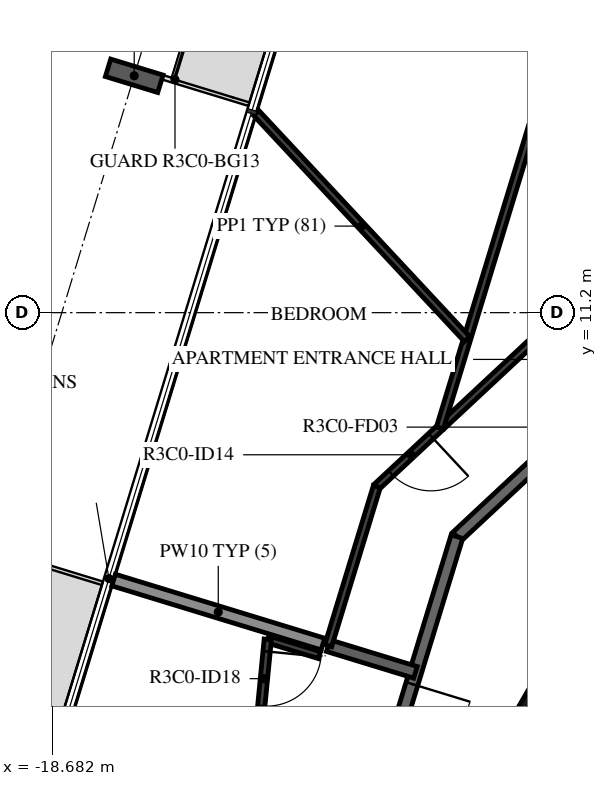
"""IFC4 building model, lengths in metres.
Left out: names, types, materials, properties, quantities, classifications, styles, units other than length and angle.
Written with IfcOpenShell. Run it as: python <this file> out.ifc"""

import sys

from ifc_helpers import new_model, si_unit, direction, frame, frame_2d, origin, origin_2d, place, context, subcontext, project, spatial, rectangle, i_section, extrude, element, fill, save


model = new_model("IFC4")
c1 = context("Model", 3, precision=1e-05, world=origin(), true_north=direction((0.0, 1.0)))
c2 = subcontext(c1, "Body", "Model", "MODEL_VIEW")
j1 = project(units=[si_unit("LENGTHUNIT", "METRE"), si_unit("PLANEANGLEUNIT", "RADIAN")], contexts=[c1])
p1 = place(None, origin())
s1 = spatial("IfcSite", under=j1, at=p1, CompositionType="ELEMENT")
p2 = place(p1, origin())
s2 = spatial("IfcBuilding", under=s1, at=p2, CompositionType="ELEMENT")
p3 = place(p2, frame((0.0, 0.0, 134.4)))
s3 = spatial("IfcBuildingStorey", under=s2, at=p3, CompositionType="ELEMENT", Elevation=134.4)
p4 = place(p3, frame((-17.335, 15.095, -0.38), z_axis=(0.0, 0.0, 1.0), x_axis=(0.29237190653, 0.956304694264, 0.0)))
e1 = element("IfcColumn", 1, at=p4, inside=s3, PredefinedType="COLUMN", context=c2, shape_type="SweptSolid", body=[
    extrude(i_section(OverallWidth=0.3, OverallDepth=0.9, WebThickness=0.019, FlangeThickness=0.035, FilletRadius=0.03, at=origin_2d()), origin(), (0.0, 0.0, 1.0), 3.5),
])
p5 = place(p3, frame((-9.329, 7.137, 0.0), z_axis=(0.0, 0.0, 1.0), x_axis=(-0.500087131594, -0.865975092491, 0.0)))
e2 = element("IfcWall", 2, at=p5, inside=s3, PredefinedType="SHEAR", context=c2, shape_type="SweptSolid", body=[
    extrude(rectangle(XDim=3.033, YDim=0.5, at=frame_2d((1.516, 0.0))), origin(), (0.0, 0.0, 1.0), 3.12),
])
p6 = place(p3, frame((-6.659, 12.523, 0.0), z_axis=(0.0, 0.0, 1.0), x_axis=(-0.731350455479, -0.682001841105, 0.0)))
e3 = element("IfcWall", 3, at=p6, inside=s3, PredefinedType="STANDARD", context=c2, shape_type="SweptSolid", body=[
    extrude(rectangle(XDim=7.342, YDim=0.2, at=frame_2d((3.671, 0.0))), origin(), (0.0, 0.0, 1.0), 3.12),
])
p7 = place(p6, frame((4.2, 0.0, 0.0)))
e4 = element("IfcOpeningElement", 4, at=p7, cuts=e3, PredefinedType="OPENING", context=c2, shape_type="SweptSolid", body=[
    extrude(rectangle(XDim=1.0, YDim=2.1, at=frame_2d((0.5, 1.05))), frame((0.0, 0.11, 0.0), z_axis=(0.0, -1.0, 0.0), x_axis=(1.0, 0.0, 0.0)), (0.0, 0.0, 1.0), 0.22),
])
p8 = place(p3, frame((-12.028, 7.516, 0.0), z_axis=(0.0, 0.0, 1.0), x_axis=(-0.292365533182, -0.956306642771, 0.0)))
e5 = element("IfcWall", 5, at=p8, inside=s3, PredefinedType="STANDARD", context=c2, shape_type="SweptSolid", body=[
    extrude(rectangle(XDim=7.342, YDim=0.2, at=frame_2d((3.671, 0.0))), origin(), (0.0, 0.0, 1.0), 3.12),
])
p9 = place(p8, frame((2.533, 0.0, 0.0)))
e6 = element("IfcOpeningElement", 6, at=p9, cuts=e5, PredefinedType="OPENING", context=c2, shape_type="SweptSolid", body=[
    extrude(rectangle(XDim=1.0, YDim=2.1, at=frame_2d((0.5, 1.05))), frame((0.0, 0.11, 0.0), z_axis=(0.0, -1.0, 0.0), x_axis=(1.0, 0.0, 0.0)), (0.0, 0.0, 1.0), 0.22),
])
p10 = place(p3, frame((-14.145, 5.724, 0.0), z_axis=(0.0, 0.0, 1.0), x_axis=(0.956266872747, -0.292495586439, 0.0)))
e7 = element("IfcWall", 7, at=p10, inside=s3, PredefinedType="STANDARD", context=c2, shape_type="SweptSolid", body=[
    extrude(rectangle(XDim=1.5, YDim=0.2, at=frame_2d((0.75, 0.0))), origin(), (0.0, 0.0, 1.0), 3.12),
])
p11 = place(p3, frame((-17.674, 6.803, 0.0), z_axis=(0.0, 0.0, 1.0), x_axis=(0.956293645939, -0.292408041504, 0.0)))
e8 = element("IfcWall", 8, at=p11, inside=s3, PredefinedType="STANDARD", context=c2, shape_type="SweptSolid", body=[
    extrude(rectangle(XDim=3.6, YDim=0.2, at=frame_2d((1.8, 0.0))), origin(), (0.0, 0.0, 1.0), 2.73),
])
p12 = place(p3, frame((-7.388, 13.894, 0.0), z_axis=(0.0, 0.0, 1.0), x_axis=(-0.731357186721, -0.681994622729, 0.0)))
e9 = element("IfcWall", 9, at=p12, inside=s3, PredefinedType="PARTITIONING", context=c2, shape_type="SweptSolid", body=[
    extrude(rectangle(XDim=8.146, YDim=0.12, at=frame_2d((4.073, 0.0))), origin(), (0.0, 0.0, 1.0), 3.12),
])
p13 = place(p12, frame((0.725, 0.0, 0.0)))
e10 = element("IfcOpeningElement", 10, at=p13, cuts=e9, PredefinedType="OPENING", context=c2, shape_type="SweptSolid", body=[
    extrude(rectangle(XDim=0.8, YDim=2.1, at=frame_2d((0.4, 1.05))), frame((0.0, 0.07, 0.0), z_axis=(0.0, -1.0, 0.0), x_axis=(1.0, 0.0, 0.0)), (0.0, 0.0, 1.0), 0.14),
])
p14 = place(p12, frame((6.927, 0.0, 0.0)))
e11 = element("IfcOpeningElement", 11, at=p14, cuts=e9, PredefinedType="OPENING", context=c2, shape_type="SweptSolid", body=[
    extrude(rectangle(XDim=0.9, YDim=2.1, at=frame_2d((0.45, 1.05))), frame((0.0, 0.07, 0.0), z_axis=(0.0, -1.0, 0.0), x_axis=(1.0, 0.0, 0.0)), (0.0, 0.0, 1.0), 0.14),
])
p15 = place(p3, frame((-13.345, 8.339, 0.0), z_axis=(0.0, 0.0, 1.0), x_axis=(-0.292316072367, -0.956321762712, 0.0)))
e12 = element("IfcWall", 12, at=p15, inside=s3, PredefinedType="PARTITIONING", context=c2, shape_type="SweptSolid", body=[
    extrude(rectangle(XDim=2.734, YDim=0.12, at=frame_2d((1.367, 0.0))), origin(), (0.0, 0.0, 1.0), 3.12),
])
p16 = place(p3, frame((-8.417, 22.031, 0.0), z_axis=(0.0, 0.0, 1.0), x_axis=(-0.292371891841, -0.956304698755, 0.0)))
e13 = element("IfcWall", 13, at=p16, inside=s3, PredefinedType="PARTITIONING", context=c2, shape_type="SweptSolid", body=[
    extrude(rectangle(XDim=13.306, YDim=0.12, at=frame_2d((6.653, 0.0))), origin(), (0.0, 0.0, 1.0), 3.12),
])
p17 = place(p16, frame((2.777, 0.0, 0.0)))
e14 = element("IfcOpeningElement", 14, at=p17, cuts=e13, PredefinedType="OPENING", context=c2, shape_type="SweptSolid", body=[
    extrude(rectangle(XDim=0.9, YDim=2.1, at=frame_2d((0.45, 1.05))), frame((0.0, 0.07, 0.0), z_axis=(0.0, -1.0, 0.0), x_axis=(1.0, 0.0, 0.0)), (0.0, 0.0, 1.0), 0.14),
])
p18 = place(p3, frame((-15.327, 14.481, 0.0), z_axis=(0.0, 0.0, 1.0), x_axis=(0.68197575128, -0.731374783997, 0.0)))
e15 = element("IfcWall", 15, at=p18, inside=s3, PredefinedType="PARTITIONING", context=c2, shape_type="SweptSolid", body=[
    extrude(rectangle(XDim=5.081, YDim=0.12, at=frame_2d((2.54, 0.0))), origin(), (0.0, 0.0, 1.0), 3.12),
])
p19 = place(p3, frame((-14.287, 5.568, 0.0), z_axis=(0.0, 0.0, 1.0), x_axis=(-0.956287662261, 0.292427609859, 0.0)))
e16 = element("IfcWall", 16, at=p19, inside=s3, PredefinedType="PARTITIONING", context=c2, shape_type="SweptSolid", body=[
    extrude(rectangle(XDim=0.89, YDim=0.12, at=frame_2d((0.445, 0.0))), origin(), (0.0, 0.0, 1.0), 3.12),
])
p20 = place(p3, frame((-15.138, 5.828, 0.0), z_axis=(0.0, 0.0, 1.0), x_axis=(-0.096967255409, -0.995287572201, 0.0)))
e17 = element("IfcWall", 17, at=p20, inside=s3, PredefinedType="PARTITIONING", context=c2, shape_type="SweptSolid", body=[
    extrude(rectangle(XDim=4.489, YDim=0.12, at=frame_2d((2.245, 0.0))), origin(), (0.0, 0.0, 1.0), 3.12),
])
p21 = place(p20, frame((0.2, 0.0, 0.0)))
e18 = element("IfcOpeningElement", 18, at=p21, cuts=e17, PredefinedType="OPENING", context=c2, shape_type="SweptSolid", body=[
    extrude(rectangle(XDim=0.9, YDim=2.1, at=frame_2d((0.45, 1.05))), frame((0.0, 0.07, 0.0), z_axis=(0.0, -1.0, 0.0), x_axis=(1.0, 0.0, 0.0)), (0.0, 0.0, 1.0), 0.14),
])
p22 = place(p14, origin())
e19 = element("IfcDoor", 19, at=p22, inside=s3, OperationType="SINGLE_SWING_LEFT", PredefinedType="DOOR", context=c2, shape_type="SweptSolid", body=[
    extrude(rectangle(XDim=0.9, YDim=2.1, at=frame_2d((0.45, 1.05))), frame((0.0, 0.025, 0.0), z_axis=(0.0, -1.0, 0.0), x_axis=(1.0, 0.0, 0.0)), (0.0, 0.0, 1.0), 0.05),
])
fill(e11, e19)
p23 = place(p9, origin())
e20 = element("IfcDoor", 20, at=p23, inside=s3, OperationType="SINGLE_SWING_LEFT", PredefinedType="DOOR", context=c2, shape_type="SweptSolid", body=[
    extrude(rectangle(XDim=1.0, YDim=2.1, at=frame_2d((0.5, 1.05))), frame((0.0, 0.025, 0.0), z_axis=(0.0, -1.0, 0.0), x_axis=(1.0, 0.0, 0.0)), (0.0, 0.0, 1.0), 0.05),
])
fill(e6, e20)
p24 = place(p21, origin())
e21 = element("IfcDoor", 21, at=p24, inside=s3, OperationType="SINGLE_SWING_LEFT", PredefinedType="DOOR", context=c2, shape_type="SweptSolid", body=[
    extrude(rectangle(XDim=0.9, YDim=2.1, at=frame_2d((0.45, 1.05))), frame((0.0, 0.025, 0.0), z_axis=(0.0, -1.0, 0.0), x_axis=(1.0, 0.0, 0.0)), (0.0, 0.0, 1.0), 0.05),
])
fill(e18, e21)
save(model, sys.argv[1])
